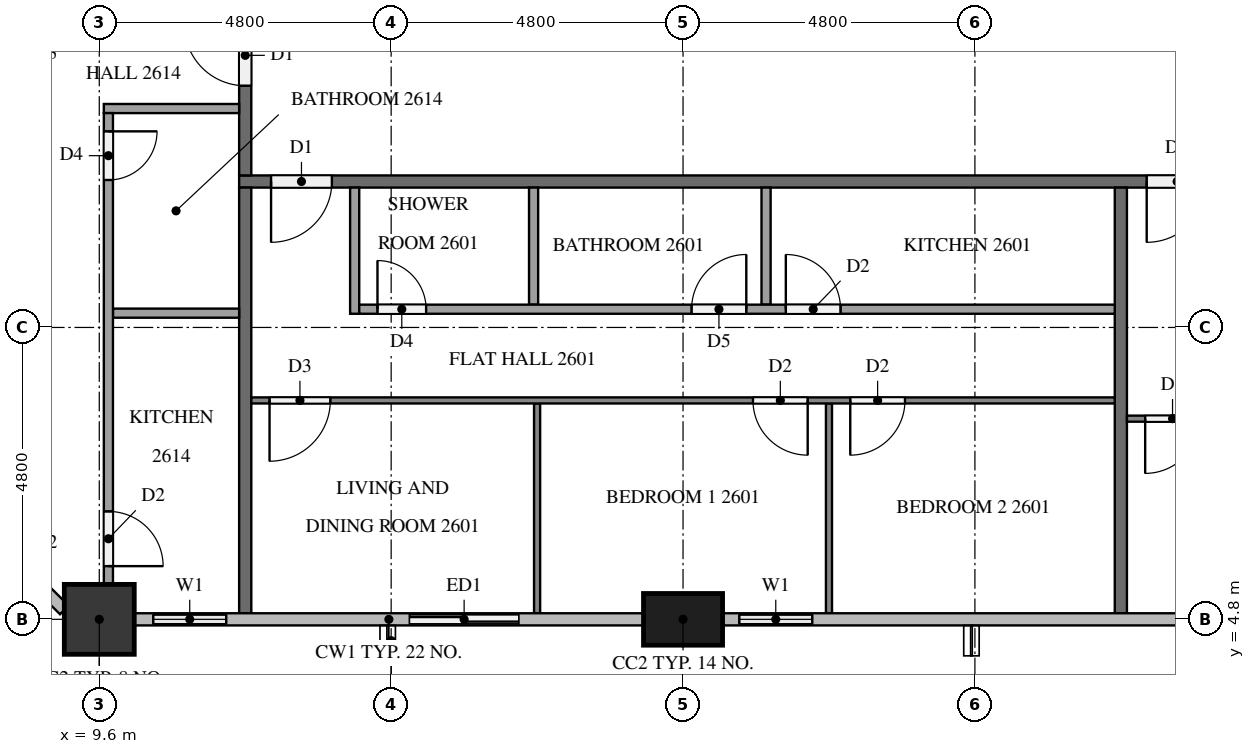
"""IFC4 building model, lengths in metres.
Left out: names, types, materials, properties, quantities, classifications, styles, units other than length and angle.
Written with IfcOpenShell. Run it as: python <this file> out.ifc"""

import sys

from ifc_helpers import new_model, si_unit, direction, frame, frame_2d, origin, origin_2d, place, context, subcontext, project, spatial, rectangle, extrude, element, fill, save


model = new_model("IFC4")
c1 = context("Model", 3, precision=1e-05, world=origin(), true_north=direction((0.0, 1.0)))
c2 = subcontext(c1, "Body", "Model", "MODEL_VIEW")
j1 = project(units=[si_unit("LENGTHUNIT", "METRE"), si_unit("PLANEANGLEUNIT", "RADIAN")], contexts=[c1])
p1 = place(None, origin())
s1 = spatial("IfcSite", under=j1, at=p1, CompositionType="ELEMENT")
p2 = place(p1, origin())
s2 = spatial("IfcBuilding", under=s1, at=p2, CompositionType="ELEMENT")
p3 = place(p2, frame((0.0, 0.0, 103.2)))
s3 = spatial("IfcBuildingStorey", under=s2, at=p3, CompositionType="ELEMENT", Elevation=103.2)
p4 = place(p3, frame((9.6, 4.8, 0.0), z_axis=(0.0, 0.0, 1.0), x_axis=(1.0, 0.0, 0.0)))
e1 = element("IfcColumn", 1, at=p4, inside=s3, PredefinedType="COLUMN", context=c2, shape_type="SweptSolid", body=[
    extrude(rectangle(XDim=1.15, YDim=1.15, at=origin_2d()), origin(), (0.0, 0.0, 1.0), 3.2),
])
p5 = place(p3, frame((19.2, 4.8, 0.0), z_axis=(0.0, 0.0, 1.0), x_axis=(1.0, 0.0, 0.0)))
e2 = element("IfcColumn", 2, at=p5, inside=s3, PredefinedType="COLUMN", context=c2, shape_type="SweptSolid", body=[
    extrude(rectangle(XDim=1.3, YDim=0.85, at=origin_2d()), origin(), (0.0, 0.0, 1.0), 3.2),
])
p6 = place(p3, frame((10.175, 4.8, 0.0), z_axis=(0.0, 0.0, 1.0), x_axis=(1.0, 0.0, 0.0)))
e3 = element("IfcWall", 3, at=p6, inside=s3, PredefinedType="SOLIDWALL", context=c2, shape_type="SweptSolid", body=[
    extrude(rectangle(XDim=1.825, YDim=0.15, at=frame_2d((0.913, 0.0))), origin(), (0.0, 0.0, 1.0), 3.2),
])
p7 = place(p6, frame((0.312, 0.0, 0.9)))
e4 = element("IfcOpeningElement", 4, at=p7, cuts=e3, PredefinedType="OPENING", context=c2, shape_type="SweptSolid", body=[
    extrude(rectangle(XDim=1.2, YDim=1.4, at=frame_2d((0.6, 0.7))), frame((0.0, 0.085, 0.0), z_axis=(0.0, -1.0, 0.0), x_axis=(1.0, 0.0, 0.0)), (0.0, 0.0, 1.0), 0.17),
])
p8 = place(p3, frame((14.4, 4.8, 0.0), z_axis=(0.0, 0.0, 1.0), x_axis=(1.0, 0.0, 0.0)))
e5 = element("IfcWall", 5, at=p8, inside=s3, PredefinedType="SOLIDWALL", context=c2, shape_type="SweptSolid", body=[
    extrude(rectangle(XDim=2.4, YDim=0.15, at=frame_2d((1.2, 0.0))), origin(), (0.0, 0.0, 1.0), 3.2),
])
p9 = place(p8, frame((0.3, 0.0, 0.0)))
e6 = element("IfcOpeningElement", 6, at=p9, cuts=e5, PredefinedType="OPENING", context=c2, shape_type="SweptSolid", body=[
    extrude(rectangle(XDim=1.8, YDim=2.4, at=frame_2d((0.9, 1.2))), frame((0.0, 0.085, 0.0), z_axis=(0.0, -1.0, 0.0), x_axis=(1.0, 0.0, 0.0)), (0.0, 0.0, 1.0), 0.17),
])
p10 = place(p3, frame((19.85, 4.8, 0.0), z_axis=(0.0, 0.0, 1.0), x_axis=(1.0, 0.0, 0.0)))
e7 = element("IfcWall", 7, at=p10, inside=s3, PredefinedType="SOLIDWALL", context=c2, shape_type="SweptSolid", body=[
    extrude(rectangle(XDim=1.75, YDim=0.15, at=frame_2d((0.875, 0.0))), origin(), (0.0, 0.0, 1.0), 3.2),
])
p11 = place(p10, frame((0.275, 0.0, 0.9)))
e8 = element("IfcOpeningElement", 8, at=p11, cuts=e7, PredefinedType="OPENING", context=c2, shape_type="SweptSolid", body=[
    extrude(rectangle(XDim=1.2, YDim=1.4, at=frame_2d((0.6, 0.7))), frame((0.0, 0.085, 0.0), z_axis=(0.0, -1.0, 0.0), x_axis=(1.0, 0.0, 0.0)), (0.0, 0.0, 1.0), 0.17),
])
p12 = place(p3, frame((50.5, 12.0, 0.0), z_axis=(0.0, 0.0, 1.0), x_axis=(-1.0, 0.0, 0.0)))
e9 = element("IfcWall", 9, at=p12, inside=s3, PredefinedType="PARTITIONING", context=c2, shape_type="SweptSolid", body=[
    extrude(rectangle(XDim=38.6, YDim=0.2, at=frame_2d((19.3, 0.0))), origin(), (0.0, 0.0, 1.0), 3.2),
])
p13 = place(p12, frame((37.075, 0.0, 0.0)))
e10 = element("IfcOpeningElement", 10, at=p13, cuts=e9, PredefinedType="OPENING", context=c2, shape_type="SweptSolid", body=[
    extrude(rectangle(XDim=1.0, YDim=2.1, at=frame_2d((0.5, 1.05))), frame((0.0, 0.11, 0.0), z_axis=(0.0, -1.0, 0.0), x_axis=(1.0, 0.0, 0.0)), (0.0, 0.0, 1.0), 0.22),
])
p14 = place(p12, frame((22.675, 0.0, 0.0)))
e11 = element("IfcOpeningElement", 11, at=p14, cuts=e9, PredefinedType="OPENING", context=c2, shape_type="SweptSolid", body=[
    extrude(rectangle(XDim=1.0, YDim=2.1, at=frame_2d((0.5, 1.05))), frame((0.0, 0.11, 0.0), z_axis=(0.0, -1.0, 0.0), x_axis=(1.0, 0.0, 0.0)), (0.0, 0.0, 1.0), 0.22),
])
p15 = place(p12, frame((0.525, 0.0, 0.0)))
e12 = element("IfcOpeningElement", 12, at=p15, cuts=e9, PredefinedType="OPENING", context=c2, shape_type="SweptSolid", body=[
    extrude(rectangle(XDim=1.0, YDim=2.1, at=frame_2d((0.5, 1.05))), frame((0.0, 0.11, 0.0), z_axis=(0.0, -1.0, 0.0), x_axis=(1.0, 0.0, 0.0)), (0.0, 0.0, 1.0), 0.22),
])
p16 = place(p3, frame((12.0, 12.1, 0.0), z_axis=(0.0, 0.0, 1.0), x_axis=(0.0, 1.0, 0.0)))
e13 = element("IfcWall", 13, at=p16, inside=s3, PredefinedType="PARTITIONING", context=c2, shape_type="SweptSolid", body=[
    extrude(rectangle(XDim=2.8, YDim=0.2, at=frame_2d((1.4, 0.0))), origin(), (0.0, 0.0, 1.0), 3.2),
])
p17 = place(p16, frame((1.475, 0.0, 0.0)))
e14 = element("IfcOpeningElement", 14, at=p17, cuts=e13, PredefinedType="OPENING", context=c2, shape_type="SweptSolid", body=[
    extrude(rectangle(XDim=1.0, YDim=2.1, at=frame_2d((0.5, 1.05))), frame((0.0, 0.11, 0.0), z_axis=(0.0, -1.0, 0.0), x_axis=(1.0, 0.0, 0.0)), (0.0, 0.0, 1.0), 0.22),
])
for number, where, z_axis, x_axis in (
    (15, (26.4, 11.9, 0.0), (0.0, 0.0, 1.0), (0.0, -1.0, 0.0)),
    (16, (12.0, 4.9, 0.0), (0.0, 0.0, 1.0), (0.0, 1.0, 0.0)),
):
    element("IfcWall", number, at=place(p3, frame(where, z_axis=z_axis, x_axis=x_axis)), inside=s3, PredefinedType="PARTITIONING", context=c2, shape_type="SweptSolid", body=[
        extrude(rectangle(XDim=7.0, YDim=0.2, at=frame_2d((3.5, 0.0))), origin(), (0.0, 0.0, 1.0), 3.2),
    ])
for number, where, z_axis, x_axis in (
    (17, (16.8, 8.35, 0.0), (0.0, 0.0, 1.0), (0.0, -1.0, 0.0)),
    (18, (21.6, 8.35, 0.0), (0.0, 0.0, 1.0), (0.0, -1.0, 0.0)),
):
    element("IfcWall", number, at=place(p3, frame(where, z_axis=z_axis, x_axis=x_axis)), inside=s3, PredefinedType="PARTITIONING", context=c2, shape_type="SweptSolid", body=[
        extrude(rectangle(XDim=3.45, YDim=0.1, at=frame_2d((1.725, 0.0))), origin(), (0.0, 0.0, 1.0), 3.2),
    ])
p18 = place(p3, frame((26.3, 8.4, 0.0), z_axis=(0.0, 0.0, 1.0), x_axis=(-1.0, 0.0, 0.0)))
e19 = element("IfcWall", 19, at=p18, inside=s3, PredefinedType="PARTITIONING", context=c2, shape_type="SweptSolid", body=[
    extrude(rectangle(XDim=14.2, YDim=0.1, at=frame_2d((7.1, 0.0))), origin(), (0.0, 0.0, 1.0), 3.2),
])
p19 = place(p18, frame((12.9, 0.0, 0.0)))
e20 = element("IfcOpeningElement", 20, at=p19, cuts=e19, PredefinedType="OPENING", context=c2, shape_type="SweptSolid", body=[
    extrude(rectangle(XDim=1.0, YDim=2.1, at=frame_2d((0.5, 1.05))), frame((0.0, 0.06, 0.0), z_axis=(0.0, -1.0, 0.0), x_axis=(1.0, 0.0, 0.0)), (0.0, 0.0, 1.0), 0.12),
])
p20 = place(p18, frame((5.05, 0.0, 0.0)))
e21 = element("IfcOpeningElement", 21, at=p20, cuts=e19, PredefinedType="OPENING", context=c2, shape_type="SweptSolid", body=[
    extrude(rectangle(XDim=0.9, YDim=2.1, at=frame_2d((0.45, 1.05))), frame((0.0, 0.06, 0.0), z_axis=(0.0, -1.0, 0.0), x_axis=(1.0, 0.0, 0.0)), (0.0, 0.0, 1.0), 0.12),
])
p21 = place(p18, frame((3.45, 0.0, 0.0)))
e22 = element("IfcOpeningElement", 22, at=p21, cuts=e19, PredefinedType="OPENING", context=c2, shape_type="SweptSolid", body=[
    extrude(rectangle(XDim=0.9, YDim=2.1, at=frame_2d((0.45, 1.05))), frame((0.0, 0.06, 0.0), z_axis=(0.0, -1.0, 0.0), x_axis=(1.0, 0.0, 0.0)), (0.0, 0.0, 1.0), 0.12),
])
for number, where, z_axis, x_axis in (
    (23, (16.742, 11.9, 0.0), (0.0, 0.0, 1.0), (0.0, -1.0, 0.0)),
    (24, (20.565, 11.9, 0.0), (0.0, 0.0, 1.0), (0.0, -1.0, 0.0)),
):
    element("IfcWall", number, at=place(p3, frame(where, z_axis=z_axis, x_axis=x_axis)), inside=s3, PredefinedType="PARTITIONING", context=c2, shape_type="SweptSolid", body=[
        extrude(rectangle(XDim=1.925, YDim=0.15, at=frame_2d((0.962, 0.0))), origin(), (0.0, 0.0, 1.0), 3.2),
    ])
p22 = place(p3, frame((13.8, 11.9, 0.0), z_axis=(0.0, 0.0, 1.0), x_axis=(0.0, -1.0, 0.0)))
e25 = element("IfcWall", 25, at=p22, inside=s3, PredefinedType="PARTITIONING", context=c2, shape_type="SweptSolid", body=[
    extrude(rectangle(XDim=2.075, YDim=0.15, at=frame_2d((1.038, 0.0))), origin(), (0.0, 0.0, 1.0), 3.2),
])
p23 = place(p3, frame((13.875, 9.9, 0.0), z_axis=(0.0, 0.0, 1.0), x_axis=(1.0, 0.0, 0.0)))
e26 = element("IfcWall", 26, at=p23, inside=s3, PredefinedType="PARTITIONING", context=c2, shape_type="SweptSolid", body=[
    extrude(rectangle(XDim=12.425, YDim=0.15, at=frame_2d((6.212, 0.0))), origin(), (0.0, 0.0, 1.0), 3.2),
])
p24 = place(p23, frame((0.3, 0.0, 0.0)))
e27 = element("IfcOpeningElement", 27, at=p24, cuts=e26, PredefinedType="OPENING", context=c2, shape_type="SweptSolid", body=[
    extrude(rectangle(XDim=0.8, YDim=2.1, at=frame_2d((0.4, 1.05))), frame((0.0, 0.085, 0.0), z_axis=(0.0, -1.0, 0.0), x_axis=(1.0, 0.0, 0.0)), (0.0, 0.0, 1.0), 0.17),
])
p25 = place(p23, frame((5.465, 0.0, 0.0)))
e28 = element("IfcOpeningElement", 28, at=p25, cuts=e26, PredefinedType="OPENING", context=c2, shape_type="SweptSolid", body=[
    extrude(rectangle(XDim=0.9, YDim=2.1, at=frame_2d((0.45, 1.05))), frame((0.0, 0.085, 0.0), z_axis=(0.0, -1.0, 0.0), x_axis=(1.0, 0.0, 0.0)), (0.0, 0.0, 1.0), 0.17),
])
p26 = place(p23, frame((7.015, 0.0, 0.0)))
e29 = element("IfcOpeningElement", 29, at=p26, cuts=e26, PredefinedType="OPENING", context=c2, shape_type="SweptSolid", body=[
    extrude(rectangle(XDim=0.9, YDim=2.1, at=frame_2d((0.45, 1.05))), frame((0.0, 0.085, 0.0), z_axis=(0.0, -1.0, 0.0), x_axis=(1.0, 0.0, 0.0)), (0.0, 0.0, 1.0), 0.17),
])
p27 = place(p3, frame((40.7, 8.1, 0.0), z_axis=(0.0, 0.0, 1.0), x_axis=(-1.0, 0.0, 0.0)))
e30 = element("IfcWall", 30, at=p27, inside=s3, PredefinedType="PARTITIONING", context=c2, shape_type="SweptSolid", body=[
    extrude(rectangle(XDim=14.2, YDim=0.1, at=frame_2d((7.1, 0.0))), origin(), (0.0, 0.0, 1.0), 3.2),
])
p28 = place(p27, frame((13.0, 0.0, 0.0)))
e31 = element("IfcOpeningElement", 31, at=p28, cuts=e30, PredefinedType="OPENING", context=c2, shape_type="SweptSolid", body=[
    extrude(rectangle(XDim=0.9, YDim=2.1, at=frame_2d((0.45, 1.05))), frame((0.0, 0.06, 0.0), z_axis=(0.0, -1.0, 0.0), x_axis=(1.0, 0.0, 0.0)), (0.0, 0.0, 1.0), 0.12),
])
p29 = place(p27, frame((5.05, 0.0, 0.0)))
e32 = element("IfcOpeningElement", 32, at=p29, cuts=e30, PredefinedType="OPENING", context=c2, shape_type="SweptSolid", body=[
    extrude(rectangle(XDim=1.0, YDim=2.1, at=frame_2d((0.5, 1.05))), frame((0.0, 0.06, 0.0), z_axis=(0.0, -1.0, 0.0), x_axis=(1.0, 0.0, 0.0)), (0.0, 0.0, 1.0), 0.12),
])
p30 = place(p27, frame((3.45, 0.0, 0.0)))
e33 = element("IfcOpeningElement", 33, at=p30, cuts=e30, PredefinedType="OPENING", context=c2, shape_type="SweptSolid", body=[
    extrude(rectangle(XDim=0.9, YDim=2.1, at=frame_2d((0.45, 1.05))), frame((0.0, 0.06, 0.0), z_axis=(0.0, -1.0, 0.0), x_axis=(1.0, 0.0, 0.0)), (0.0, 0.0, 1.0), 0.12),
])
p31 = place(p3, frame((11.9, 9.835, 0.0), z_axis=(0.0, 0.0, 1.0), x_axis=(-1.0, 0.0, 0.0)))
e34 = element("IfcWall", 34, at=p31, inside=s3, PredefinedType="PARTITIONING", context=c2, shape_type="SweptSolid", body=[
    extrude(rectangle(XDim=2.075, YDim=0.15, at=frame_2d((1.038, 0.0))), origin(), (0.0, 0.0, 1.0), 3.2),
])
p32 = place(p3, frame((11.9, 13.2, 0.0), z_axis=(0.0, 0.0, 1.0), x_axis=(-1.0, 0.0, 0.0)))
e35 = element("IfcWall", 35, at=p32, inside=s3, PredefinedType="PARTITIONING", context=c2, shape_type="SweptSolid", body=[
    extrude(rectangle(XDim=2.225, YDim=0.15, at=frame_2d((1.112, 0.0))), origin(), (0.0, 0.0, 1.0), 3.2),
])
p33 = place(p3, frame((9.75, 13.125, 0.0), z_axis=(0.0, 0.0, 1.0), x_axis=(0.0, -1.0, 0.0)))
e36 = element("IfcWall", 36, at=p33, inside=s3, PredefinedType="PARTITIONING", context=c2, shape_type="SweptSolid", body=[
    extrude(rectangle(XDim=7.75, YDim=0.15, at=frame_2d((3.875, 0.0))), origin(), (0.0, 0.0, 1.0), 3.2),
])
p34 = place(p33, frame((0.3, 0.0, 0.0)))
e37 = element("IfcOpeningElement", 37, at=p34, cuts=e36, PredefinedType="OPENING", context=c2, shape_type="SweptSolid", body=[
    extrude(rectangle(XDim=0.8, YDim=2.1, at=frame_2d((0.4, 1.05))), frame((0.0, 0.085, 0.0), z_axis=(0.0, -1.0, 0.0), x_axis=(1.0, 0.0, 0.0)), (0.0, 0.0, 1.0), 0.17),
])
p35 = place(p33, frame((6.55, 0.0, 0.0)))
e38 = element("IfcOpeningElement", 38, at=p35, cuts=e36, PredefinedType="OPENING", context=c2, shape_type="SweptSolid", body=[
    extrude(rectangle(XDim=0.9, YDim=2.1, at=frame_2d((0.45, 1.05))), frame((0.0, 0.085, 0.0), z_axis=(0.0, -1.0, 0.0), x_axis=(1.0, 0.0, 0.0)), (0.0, 0.0, 1.0), 0.17),
])
p36 = place(p7, origin())
e39 = element("IfcWindow", 39, at=p36, inside=s3, PartitioningType="SINGLE_PANEL", PredefinedType="WINDOW", context=c2, shape_type="SweptSolid", body=[
    extrude(rectangle(XDim=1.2, YDim=1.4, at=frame_2d((0.6, 0.7))), frame((0.0, 0.03, 0.0), z_axis=(0.0, -1.0, 0.0), x_axis=(1.0, 0.0, 0.0)), (0.0, 0.0, 1.0), 0.06),
])
fill(e4, e39)
p37 = place(p9, origin())
e40 = element("IfcDoor", 40, at=p37, inside=s3, OperationType="SLIDING_TO_LEFT", PredefinedType="DOOR", context=c2, shape_type="SweptSolid", body=[
    extrude(rectangle(XDim=1.8, YDim=2.4, at=frame_2d((0.9, 1.2))), frame((0.0, 0.025, 0.0), z_axis=(0.0, -1.0, 0.0), x_axis=(1.0, 0.0, 0.0)), (0.0, 0.0, 1.0), 0.05),
])
fill(e6, e40)
p38 = place(p11, origin())
e41 = element("IfcWindow", 41, at=p38, inside=s3, PartitioningType="SINGLE_PANEL", PredefinedType="WINDOW", context=c2, shape_type="SweptSolid", body=[
    extrude(rectangle(XDim=1.2, YDim=1.4, at=frame_2d((0.6, 0.7))), frame((0.0, 0.03, 0.0), z_axis=(0.0, -1.0, 0.0), x_axis=(1.0, 0.0, 0.0)), (0.0, 0.0, 1.0), 0.06),
])
fill(e8, e41)
p39 = place(p13, origin())
e42 = element("IfcDoor", 42, at=p39, inside=s3, OperationType="SINGLE_SWING_RIGHT", PredefinedType="DOOR", context=c2, shape_type="SweptSolid", body=[
    extrude(rectangle(XDim=1.0, YDim=2.1, at=frame_2d((0.5, 1.05))), frame((0.0, 0.025, 0.0), z_axis=(0.0, -1.0, 0.0), x_axis=(1.0, 0.0, 0.0)), (0.0, 0.0, 1.0), 0.05),
])
fill(e10, e42)
p40 = place(p14, origin())
e43 = element("IfcDoor", 43, at=p40, inside=s3, OperationType="SINGLE_SWING_RIGHT", PredefinedType="DOOR", context=c2, shape_type="SweptSolid", body=[
    extrude(rectangle(XDim=1.0, YDim=2.1, at=frame_2d((0.5, 1.05))), frame((0.0, 0.025, 0.0), z_axis=(0.0, -1.0, 0.0), x_axis=(1.0, 0.0, 0.0)), (0.0, 0.0, 1.0), 0.05),
])
fill(e11, e43)
p41 = place(p17, origin())
e44 = element("IfcDoor", 44, at=p41, inside=s3, OperationType="SINGLE_SWING_RIGHT", PredefinedType="DOOR", context=c2, shape_type="SweptSolid", body=[
    extrude(rectangle(XDim=1.0, YDim=2.1, at=frame_2d((0.5, 1.05))), frame((0.0, 0.025, 0.0), z_axis=(0.0, -1.0, 0.0), x_axis=(1.0, 0.0, 0.0)), (0.0, 0.0, 1.0), 0.05),
])
fill(e14, e44)
p42 = place(p19, origin())
e45 = element("IfcDoor", 45, at=p42, inside=s3, OperationType="SINGLE_SWING_RIGHT", PredefinedType="DOOR", context=c2, shape_type="SweptSolid", body=[
    extrude(rectangle(XDim=1.0, YDim=2.1, at=frame_2d((0.5, 1.05))), frame((0.0, 0.025, 0.0), z_axis=(0.0, -1.0, 0.0), x_axis=(1.0, 0.0, 0.0)), (0.0, 0.0, 1.0), 0.05),
])
fill(e20, e45)
p43 = place(p20, origin())
e46 = element("IfcDoor", 46, at=p43, inside=s3, OperationType="SINGLE_SWING_LEFT", PredefinedType="DOOR", context=c2, shape_type="SweptSolid", body=[
    extrude(rectangle(XDim=0.9, YDim=2.1, at=frame_2d((0.45, 1.05))), frame((0.0, 0.025, 0.0), z_axis=(0.0, -1.0, 0.0), x_axis=(1.0, 0.0, 0.0)), (0.0, 0.0, 1.0), 0.05),
])
fill(e21, e46)
p44 = place(p21, origin())
e47 = element("IfcDoor", 47, at=p44, inside=s3, OperationType="SINGLE_SWING_RIGHT", PredefinedType="DOOR", context=c2, shape_type="SweptSolid", body=[
    extrude(rectangle(XDim=0.9, YDim=2.1, at=frame_2d((0.45, 1.05))), frame((0.0, 0.025, 0.0), z_axis=(0.0, -1.0, 0.0), x_axis=(1.0, 0.0, 0.0)), (0.0, 0.0, 1.0), 0.05),
])
fill(e22, e47)
p45 = place(p24, origin())
e48 = element("IfcDoor", 48, at=p45, inside=s3, OperationType="SINGLE_SWING_LEFT", PredefinedType="DOOR", context=c2, shape_type="SweptSolid", body=[
    extrude(rectangle(XDim=0.8, YDim=2.1, at=frame_2d((0.4, 1.05))), frame((0.0, 0.025, 0.0), z_axis=(0.0, -1.0, 0.0), x_axis=(1.0, 0.0, 0.0)), (0.0, 0.0, 1.0), 0.05),
])
fill(e27, e48)
p46 = place(p25, origin())
e49 = element("IfcDoor", 49, at=p46, inside=s3, OperationType="SINGLE_SWING_RIGHT", PredefinedType="DOOR", context=c2, shape_type="SweptSolid", body=[
    extrude(rectangle(XDim=0.9, YDim=2.1, at=frame_2d((0.45, 1.05))), frame((0.0, 0.025, 0.0), z_axis=(0.0, -1.0, 0.0), x_axis=(1.0, 0.0, 0.0)), (0.0, 0.0, 1.0), 0.05),
])
fill(e28, e49)
p47 = place(p26, origin())
e50 = element("IfcDoor", 50, at=p47, inside=s3, OperationType="SINGLE_SWING_LEFT", PredefinedType="DOOR", context=c2, shape_type="SweptSolid", body=[
    extrude(rectangle(XDim=0.9, YDim=2.1, at=frame_2d((0.45, 1.05))), frame((0.0, 0.025, 0.0), z_axis=(0.0, -1.0, 0.0), x_axis=(1.0, 0.0, 0.0)), (0.0, 0.0, 1.0), 0.05),
])
fill(e29, e50)
p48 = place(p28, origin())
e51 = element("IfcDoor", 51, at=p48, inside=s3, OperationType="SINGLE_SWING_RIGHT", PredefinedType="DOOR", context=c2, shape_type="SweptSolid", body=[
    extrude(rectangle(XDim=0.9, YDim=2.1, at=frame_2d((0.45, 1.05))), frame((0.0, 0.025, 0.0), z_axis=(0.0, -1.0, 0.0), x_axis=(1.0, 0.0, 0.0)), (0.0, 0.0, 1.0), 0.05),
])
fill(e31, e51)
p49 = place(p34, origin())
e52 = element("IfcDoor", 52, at=p49, inside=s3, OperationType="SINGLE_SWING_LEFT", PredefinedType="DOOR", context=c2, shape_type="SweptSolid", body=[
    extrude(rectangle(XDim=0.8, YDim=2.1, at=frame_2d((0.4, 1.05))), frame((0.0, 0.025, 0.0), z_axis=(0.0, -1.0, 0.0), x_axis=(1.0, 0.0, 0.0)), (0.0, 0.0, 1.0), 0.05),
])
fill(e37, e52)
p50 = place(p35, origin())
e53 = element("IfcDoor", 53, at=p50, inside=s3, OperationType="SINGLE_SWING_RIGHT", PredefinedType="DOOR", context=c2, shape_type="SweptSolid", body=[
    extrude(rectangle(XDim=0.9, YDim=2.1, at=frame_2d((0.45, 1.05))), frame((0.0, 0.025, 0.0), z_axis=(0.0, -1.0, 0.0), x_axis=(1.0, 0.0, 0.0)), (0.0, 0.0, 1.0), 0.05),
])
fill(e38, e53)
save(model, sys.argv[1])
